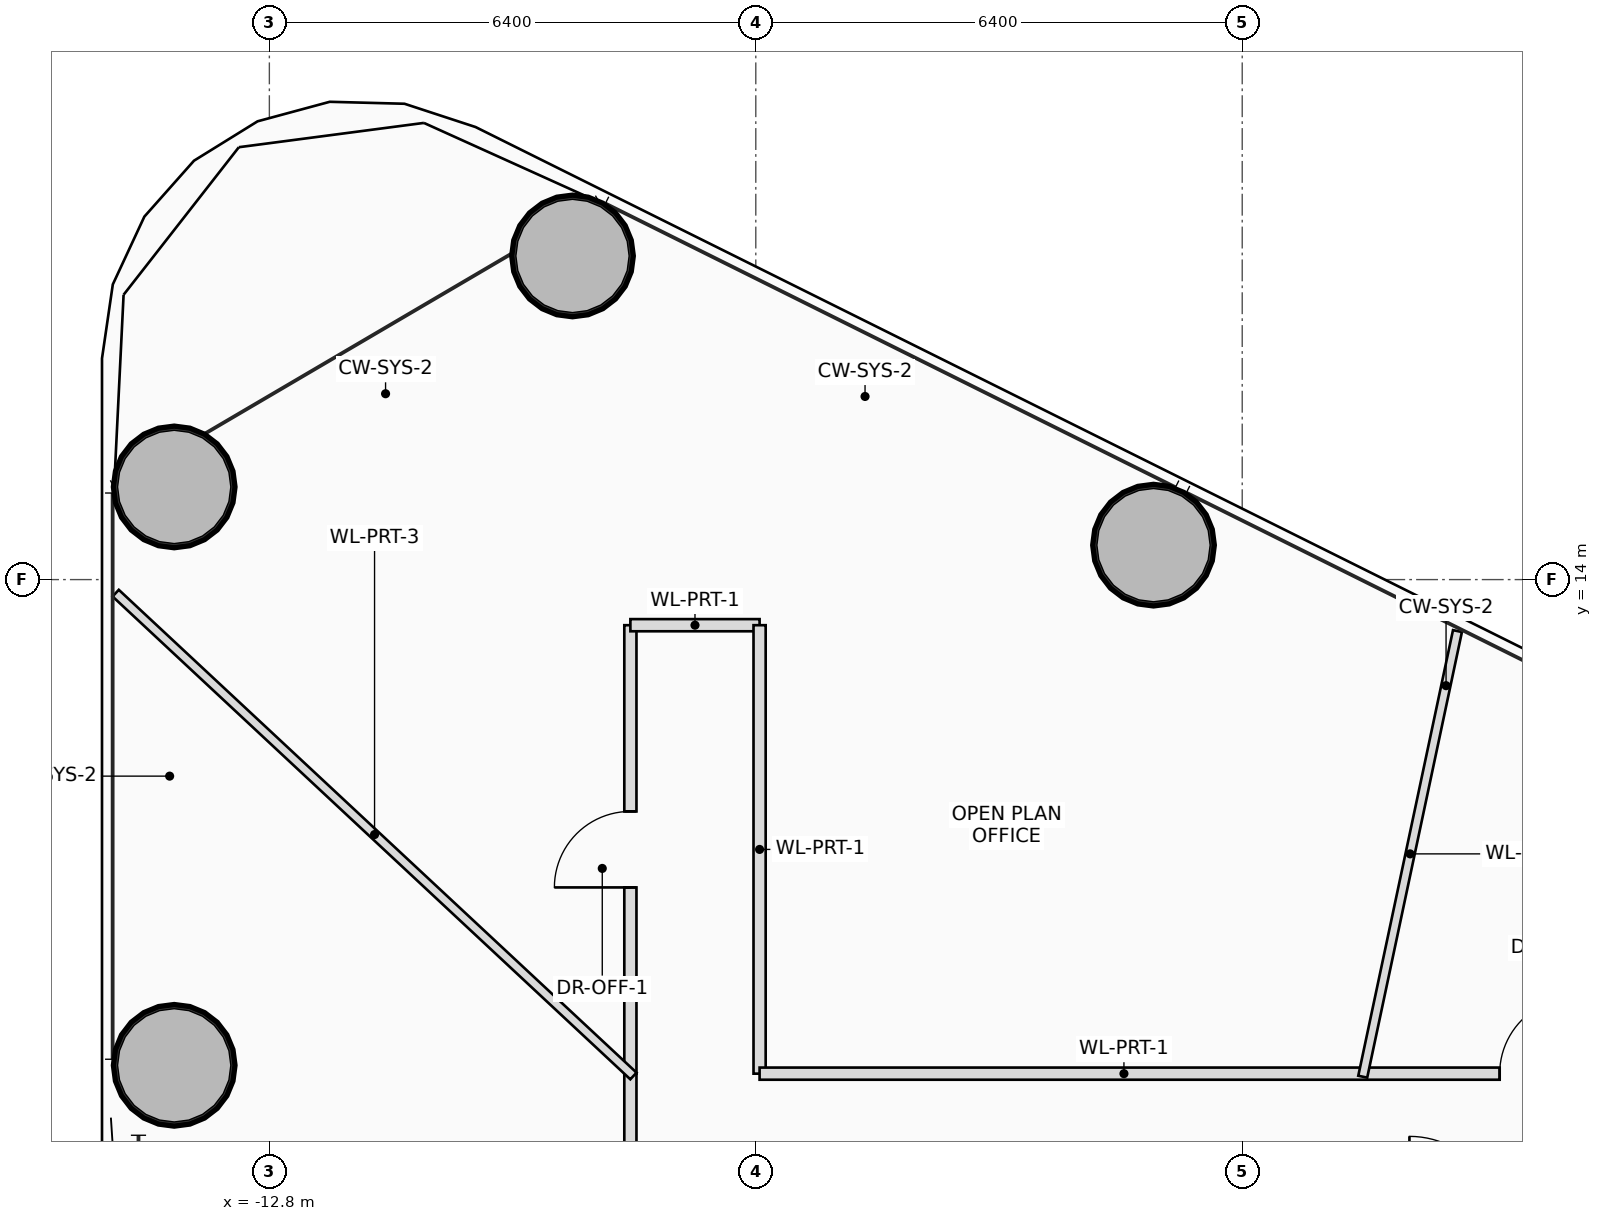
"""IFC4 building model, lengths in metres.
Left out: names, types, materials, properties, quantities, classifications, styles, units other than length and angle.
Written with IfcOpenShell. Run it as: python <this file> out.ifc"""

import sys

from ifc_helpers import new_model, si_unit, direction, frame, frame_2d, origin, origin_2d, place, context, subcontext, project, spatial, rectangle, hollow_circle, extrude, source, transform, mapped, element, fill, save


model = new_model("IFC4")
c1 = context("Model", 3, precision=1e-05, world=origin(), true_north=direction((0.0, 1.0)))
c2 = subcontext(c1, "Body", "Model", "MODEL_VIEW")
j1 = project(units=[si_unit("LENGTHUNIT", "METRE"), si_unit("PLANEANGLEUNIT", "RADIAN")], contexts=[c1])
p1 = place(None, origin())
s1 = spatial("IfcSite", under=j1, at=p1, CompositionType="ELEMENT")
p2 = place(p1, origin())
s2 = spatial("IfcBuilding", under=s1, at=p2, CompositionType="ELEMENT")
p3 = place(p2, frame((0.0, 0.0, 27.5)))
s3 = spatial("IfcBuildingStorey", under=s2, at=p3, CompositionType="ELEMENT", Elevation=27.5)
m1 = source(origin(), c2, "Body", "SweptSolid", [
    extrude(hollow_circle(Radius=0.8, WallThickness=0.055, at=origin_2d()), origin(), (0.0, 0.0, 1.0), 3.7),
])
for number, where, z_axis, x_axis in (
    (1, (-1.167, 14.453, 0.0), (0.0, 0.0, 1.0), (1.0, 0.0, 0.0)),
    (2, (-8.812, 18.258, 0.0), (0.0, 0.0, 1.0), (1.0, 0.0, 0.0)),
    (3, (-14.052, 15.219, 0.0), (0.0, 0.0, 1.0), (1.0, 0.0, 0.0)),
    (4, (-14.052, 7.61, 0.0), (0.0, 0.0, 1.0), (1.0, 0.0, 0.0)),
):
    element("IfcColumn", number, at=place(p3, frame(where, z_axis=z_axis, x_axis=x_axis)), inside=s3, PredefinedType="COLUMN", context=c2, shape_type="MappedRepresentation", body=[
        mapped(m1, transform((0.0, 0.0, 0.0), scale=1.0)),
    ])
p4 = place(p3, frame((-8.05, -7.5, 0.0), z_axis=(0.0, 0.0, 1.0), x_axis=(0.0, 1.0, 0.0)))
e5 = element("IfcWall", 5, at=p4, inside=s3, PredefinedType="PARTITIONING", context=c2, shape_type="SweptSolid", body=[
    extrude(rectangle(XDim=15.0, YDim=0.16, at=frame_2d((7.5, 0.0))), origin(), (0.0, 0.0, 1.0), 2.8),
])
p5 = place(p4, frame((7.0, 0.0, 0.0)))
e6 = element("IfcOpeningElement", 6, at=p5, cuts=e5, PredefinedType="OPENING", context=c2, shape_type="SweptSolid", body=[
    extrude(rectangle(XDim=1.0, YDim=2.25, at=frame_2d((0.5, 1.125))), frame((0.0, 0.09, 0.0), z_axis=(0.0, -1.0, 0.0), x_axis=(1.0, 0.0, 0.0)), (0.0, 0.0, 1.0), 0.18),
])
p6 = place(p3, frame((-8.05, 7.5, 0.0), z_axis=(0.0, 0.0, 1.0), x_axis=(0.0, 1.0, 0.0)))
e7 = element("IfcWall", 7, at=p6, inside=s3, PredefinedType="PARTITIONING", context=c2, shape_type="SweptSolid", body=[
    extrude(rectangle(XDim=5.9, YDim=0.16, at=frame_2d((2.95, 0.0))), origin(), (0.0, 0.0, 1.0), 2.8),
])
p7 = place(p6, frame((2.45, 0.0, 0.0)))
e8 = element("IfcOpeningElement", 8, at=p7, cuts=e7, PredefinedType="OPENING", context=c2, shape_type="SweptSolid", body=[
    extrude(rectangle(XDim=1.0, YDim=2.25, at=frame_2d((0.5, 1.125))), frame((0.0, 0.09, 0.0), z_axis=(0.0, -1.0, 0.0), x_axis=(1.0, 0.0, 0.0)), (0.0, 0.0, 1.0), 0.18),
])
p8 = place(p3, frame((-8.05, 13.4, 0.0), z_axis=(0.0, 0.0, 1.0), x_axis=(1.0, 0.0, 0.0)))
e9 = element("IfcWall", 9, at=p8, inside=s3, PredefinedType="PARTITIONING", context=c2, shape_type="SweptSolid", body=[
    extrude(rectangle(XDim=1.7, YDim=0.16, at=frame_2d((0.85, 0.0))), origin(), (0.0, 0.0, 1.0), 2.8),
])
p9 = place(p3, frame((-6.35, 13.4, 0.0), z_axis=(0.0, 0.0, 1.0), x_axis=(0.0, -1.0, 0.0)))
e10 = element("IfcWall", 10, at=p9, inside=s3, PredefinedType="PARTITIONING", context=c2, shape_type="SweptSolid", body=[
    extrude(rectangle(XDim=5.9, YDim=0.16, at=frame_2d((2.95, 0.0))), origin(), (0.0, 0.0, 1.0), 2.8),
])
p10 = place(p3, frame((-6.35, 7.5, 0.0), z_axis=(0.0, 0.0, 1.0), x_axis=(1.0, 0.0, 0.0)))
e11 = element("IfcWall", 11, at=p10, inside=s3, PredefinedType="PARTITIONING", context=c2, shape_type="SweptSolid", body=[
    extrude(rectangle(XDim=12.7, YDim=0.16, at=frame_2d((6.35, 0.0))), origin(), (0.0, 0.0, 1.0), 2.8),
])
p11 = place(p10, frame((9.737, 0.0, 0.0)))
e12 = element("IfcOpeningElement", 12, at=p11, cuts=e11, PredefinedType="OPENING", context=c2, shape_type="SweptSolid", body=[
    extrude(rectangle(XDim=1.0, YDim=2.25, at=frame_2d((0.5, 1.125))), frame((0.0, 0.09, 0.0), z_axis=(0.0, -1.0, 0.0), x_axis=(1.0, 0.0, 0.0)), (0.0, 0.0, 1.0), 0.18),
])
p12 = place(p3, frame((1.586, 7.46, 0.0), z_axis=(0.0, 0.0, 1.0), x_axis=(0.207898702609, 0.978150361373, 0.0)))
e13 = element("IfcWall", 13, at=p12, inside=s3, PredefinedType="PARTITIONING", context=c2, shape_type="SweptSolid", body=[
    extrude(rectangle(XDim=5.994, YDim=0.12, at=frame_2d((2.997, 0.0))), origin(), (0.0, 0.0, 1.0), 2.96),
])
p13 = place(p3, frame((-8.01, 7.469, 0.0), z_axis=(0.0, 0.0, 1.0), x_axis=(-0.731354171407, 0.681997856277, 0.0)))
e14 = element("IfcWall", 14, at=p13, inside=s3, PredefinedType="PARTITIONING", context=c2, shape_type="SweptSolid", body=[
    extrude(rectangle(XDim=9.314, YDim=0.12, at=frame_2d((4.657, 0.0))), origin(), (0.0, 0.0, 1.0), 2.96),
])
p14 = place(p7, origin())
e15 = element("IfcDoor", 15, at=p14, inside=s3, OperationType="SINGLE_SWING_LEFT", PredefinedType="DOOR", context=c2, shape_type="SweptSolid", body=[
    extrude(rectangle(XDim=1.0, YDim=2.25, at=frame_2d((0.5, 1.125))), frame((0.0, 0.025, 0.0), z_axis=(0.0, -1.0, 0.0), x_axis=(1.0, 0.0, 0.0)), (0.0, 0.0, 1.0), 0.05),
])
fill(e8, e15)
p15 = place(p11, origin())
e16 = element("IfcDoor", 16, at=p15, inside=s3, OperationType="SINGLE_SWING_RIGHT", PredefinedType="DOOR", context=c2, shape_type="SweptSolid", body=[
    extrude(rectangle(XDim=1.0, YDim=2.25, at=frame_2d((0.5, 1.125))), frame((0.0, 0.025, 0.0), z_axis=(0.0, -1.0, 0.0), x_axis=(1.0, 0.0, 0.0)), (0.0, 0.0, 1.0), 0.05),
])
fill(e12, e16)
save(model, sys.argv[1])
